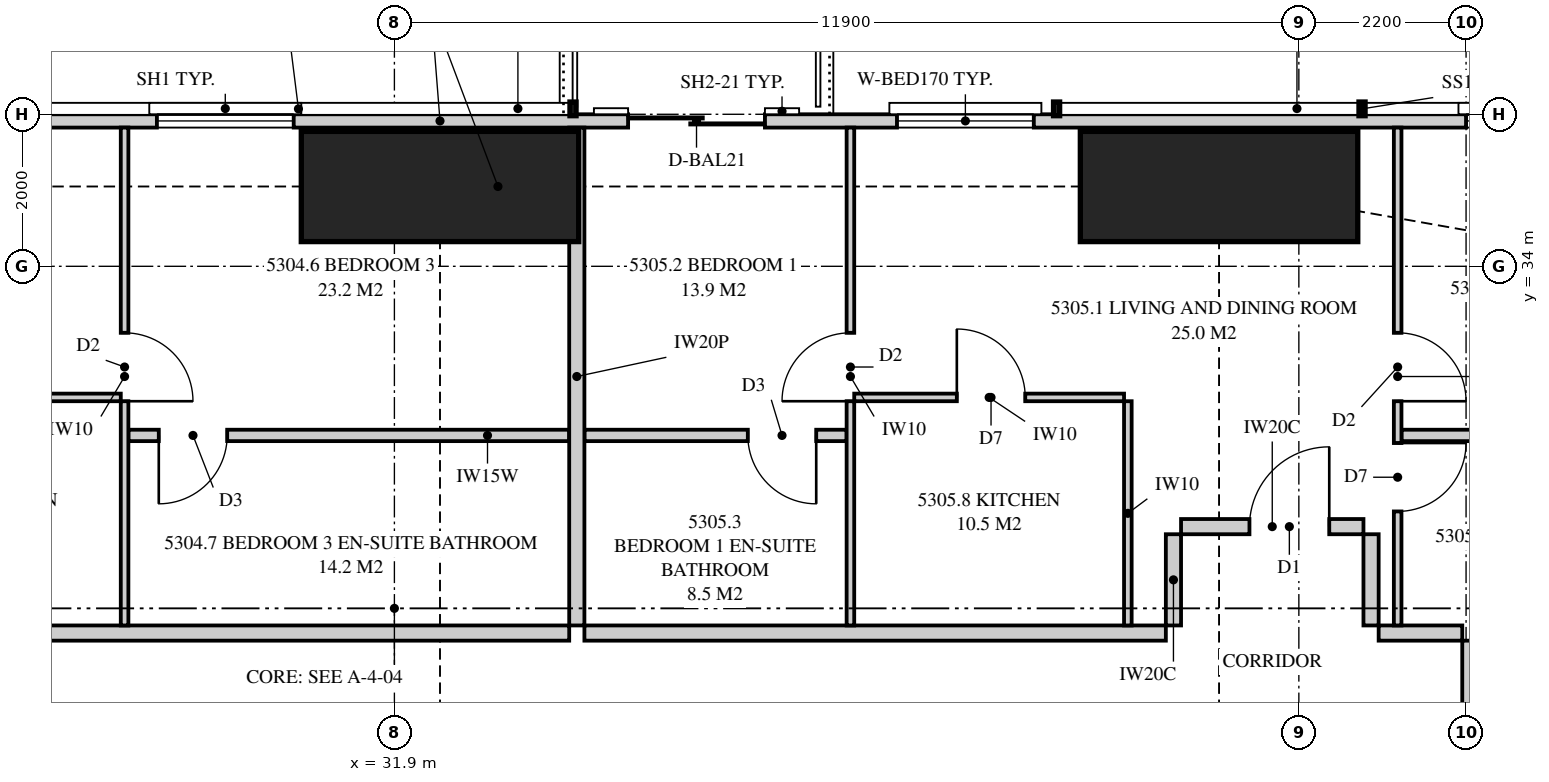
"""IFC4 building model, lengths in metres.
Left out: names, types, materials, properties, quantities, classifications, styles, units other than length and angle.
Written with IfcOpenShell. Run it as: python <this file> out.ifc"""

import sys

from ifc_helpers import new_model, si_unit, direction, frame, frame_2d, origin, origin_2d, place, context, subcontext, project, spatial, polyline, rectangle, outline, extrude, element, fill, save


model = new_model("IFC4")
c1 = context("Model", 3, precision=1e-05, world=origin(), true_north=direction((0.0, 1.0)))
c2 = subcontext(c1, "Body", "Model", "MODEL_VIEW")
j1 = project(units=[si_unit("LENGTHUNIT", "METRE"), si_unit("PLANEANGLEUNIT", "RADIAN")], contexts=[c1])
p1 = place(None, origin())
s1 = spatial("IfcSite", under=j1, at=p1, CompositionType="ELEMENT")
p2 = place(p1, origin())
s2 = spatial("IfcBuilding", under=s1, at=p2, CompositionType="ELEMENT")
p3 = place(p2, frame((0.0, 0.0, 194.55)))
s3 = spatial("IfcBuildingStorey", under=s2, at=p3, CompositionType="ELEMENT", Elevation=194.55)
for number, where, z_axis, x_axis in (
    (1, (42.75, 35.05, 0.0), (0.0, 0.0, 1.0), (0.0, 1.0, 0.0)),
    (2, (32.5, 35.05, 0.0), (0.0, 0.0, 1.0), (0.0, 1.0, 0.0)),
):
    element("IfcColumn", number, at=place(p3, frame(where, z_axis=z_axis, x_axis=x_axis)), inside=s3, PredefinedType="COLUMN", context=c2, shape_type="SweptSolid", body=[
        extrude(rectangle(XDim=1.45, YDim=3.65, at=origin_2d()), origin(), (0.0, 0.0, 1.0), 3.35),
    ])
p4 = place(p3, frame((49.949, 35.913, 0.0), z_axis=(0.0, 0.0, 1.0), x_axis=(-1.0, 0.0, 0.0)))
e3 = element("IfcWall", 3, at=p4, inside=s3, PredefinedType="SOLIDWALL", context=c2, shape_type="SweptSolid", body=[
    extrude(outline(polyline([(0.0, 0.0), (34.897, 0.0), (34.897, 3.11), (27.91, 3.11), (27.91, 2.15), (27.836, 2.15), (27.836, 3.11), (27.699, 3.11), (27.699, 2.15), (7.199, 2.15), (7.199, 3.11), (7.062, 3.11), (7.062, 2.15), (6.987, 2.15), (6.987, 3.11), (0.0, 3.11), (0.0, 0.0)])), frame((0.0, 0.087, 0.0), z_axis=(0.0, -1.0, 0.0), x_axis=(1.0, 0.0, 0.0)), (0.0, 0.0, 1.0), 0.175),
])
p5 = place(p4, frame((2.149, 0.0, 0.4)))
e4 = element("IfcOpeningElement", 4, at=p5, cuts=e3, PredefinedType="OPENING", context=c2, shape_type="SweptSolid", body=[
    extrude(rectangle(XDim=1.8, YDim=1.7, at=frame_2d((0.9, 0.85))), frame((0.0, 0.097, 0.0), z_axis=(0.0, -1.0, 0.0), x_axis=(1.0, 0.0, 0.0)), (0.0, 0.0, 1.0), 0.195),
])
p6 = place(p4, frame((9.636, 0.0, 0.4)))
e5 = element("IfcOpeningElement", 5, at=p6, cuts=e3, PredefinedType="OPENING", context=c2, shape_type="SweptSolid", body=[
    extrude(rectangle(XDim=1.8, YDim=1.7, at=frame_2d((0.9, 0.85))), frame((0.0, 0.097, 0.0), z_axis=(0.0, -1.0, 0.0), x_axis=(1.0, 0.0, 0.0)), (0.0, 0.0, 1.0), 0.195),
])
p7 = place(p4, frame((13.174, 0.0, 0.0)))
e6 = element("IfcOpeningElement", 6, at=p7, cuts=e3, PredefinedType="OPENING", context=c2, shape_type="SweptSolid", body=[
    extrude(rectangle(XDim=1.8, YDim=2.1, at=frame_2d((0.9, 1.05))), frame((0.0, 0.097, 0.0), z_axis=(0.0, -1.0, 0.0), x_axis=(1.0, 0.0, 0.0)), (0.0, 0.0, 1.0), 0.195),
])
p8 = place(p4, frame((19.374, 0.0, 0.4)))
e7 = element("IfcOpeningElement", 7, at=p8, cuts=e3, PredefinedType="OPENING", context=c2, shape_type="SweptSolid", body=[
    extrude(rectangle(XDim=1.8, YDim=1.7, at=frame_2d((0.9, 0.85))), frame((0.0, 0.097, 0.0), z_axis=(0.0, -1.0, 0.0), x_axis=(1.0, 0.0, 0.0)), (0.0, 0.0, 1.0), 0.195),
])
p9 = place(p4, frame((23.224, 0.0, 0.4)))
e8 = element("IfcOpeningElement", 8, at=p9, cuts=e3, PredefinedType="OPENING", context=c2, shape_type="SweptSolid", body=[
    extrude(rectangle(XDim=2.4, YDim=1.7, at=frame_2d((1.2, 0.85))), frame((0.0, 0.097, 0.0), z_axis=(0.0, -1.0, 0.0), x_axis=(1.0, 0.0, 0.0)), (0.0, 0.0, 1.0), 0.195),
])
p10 = place(p4, frame((32.399, 0.0, 0.4)))
e9 = element("IfcOpeningElement", 9, at=p10, cuts=e3, PredefinedType="OPENING", context=c2, shape_type="SweptSolid", body=[
    extrude(rectangle(XDim=1.8, YDim=1.7, at=frame_2d((0.9, 0.85))), frame((0.0, 0.097, 0.0), z_axis=(0.0, -1.0, 0.0), x_axis=(1.0, 0.0, 0.0)), (0.0, 0.0, 1.0), 0.195),
])
p11 = place(p3, frame((34.3, 35.825, 0.0), z_axis=(0.0, 0.0, 1.0), x_axis=(0.0, -1.0, 0.0)))
e10 = element("IfcWall", 10, at=p11, inside=s3, PredefinedType="PARTITIONING", context=c2, shape_type="SweptSolid", body=[
    extrude(outline(polyline([(0.0, 0.0), (6.55, 0.0), (6.55, 3.11), (1.685, 3.11), (1.685, 2.15), (0.0, 2.15), (0.0, 3.11), (0.0, 0.0)])), frame((0.0, 0.1, 0.0), z_axis=(0.0, -1.0, 0.0), x_axis=(1.0, 0.0, 0.0)), (0.0, 0.0, 1.0), 0.2),
])
p12 = place(p3, frame((28.35, 35.825, 0.0), z_axis=(0.0, 0.0, 1.0), x_axis=(0.0, -1.0, 0.0)))
e11 = element("IfcWall", 11, at=p12, inside=s3, PredefinedType="PARTITIONING", context=c2, shape_type="SweptSolid", body=[
    extrude(outline(polyline([(0.0, 0.0), (6.55, 0.0), (6.55, 3.11), (1.635, 3.11), (1.635, 2.15), (0.0, 2.15), (0.0, 3.11), (0.0, 0.0)])), frame((0.0, 0.05, 0.0), z_axis=(0.0, -1.0, 0.0), x_axis=(1.0, 0.0, 0.0)), (0.0, 0.0, 1.0), 0.1),
])
p13 = place(p12, frame((2.7, 0.0, 0.0)))
e12 = element("IfcOpeningElement", 12, at=p13, cuts=e11, PredefinedType="OPENING", context=c2, shape_type="SweptSolid", body=[
    extrude(rectangle(XDim=0.9, YDim=2.1, at=frame_2d((0.45, 1.05))), frame((0.0, 0.06, 0.0), z_axis=(0.0, -1.0, 0.0), x_axis=(1.0, 0.0, 0.0)), (0.0, 0.0, 1.0), 0.12),
])
p14 = place(p3, frame((28.4, 31.775, 0.0), z_axis=(0.0, 0.0, 1.0), x_axis=(1.0, 0.0, 0.0)))
e13 = element("IfcWall", 13, at=p14, inside=s3, PredefinedType="PLUMBINGWALL", context=c2, shape_type="SweptSolid", body=[
    extrude(outline(polyline([(0.0, 0.0), (5.8, 0.0), (5.8, 3.11), (4.412, 3.11), (4.412, 2.541), (3.788, 2.541), (3.788, 3.11), (0.0, 3.11), (0.0, 0.0)])), frame((0.0, 0.075, 0.0), z_axis=(0.0, -1.0, 0.0), x_axis=(1.0, 0.0, 0.0)), (0.0, 0.0, 1.0), 0.15),
])
p15 = place(p14, frame((0.4, 0.0, 0.0)))
e14 = element("IfcOpeningElement", 14, at=p15, cuts=e13, PredefinedType="OPENING", context=c2, shape_type="SweptSolid", body=[
    extrude(rectangle(XDim=0.9, YDim=2.1, at=frame_2d((0.45, 1.05))), frame((0.0, 0.085, 0.0), z_axis=(0.0, -1.0, 0.0), x_axis=(1.0, 0.0, 0.0)), (0.0, 0.0, 1.0), 0.17),
])
p16 = place(p3, frame((24.75, 32.275, 0.0), z_axis=(0.0, 0.0, 1.0), x_axis=(1.0, 0.0, 0.0)))
e15 = element("IfcWall", 15, at=p16, inside=s3, PredefinedType="PARTITIONING", context=c2, shape_type="SweptSolid", body=[
    extrude(rectangle(XDim=3.55, YDim=0.1, at=frame_2d((1.775, 0.0))), origin(), (0.0, 0.0, 1.0), 3.11),
])
p17 = place(p16, frame((1.3, 0.0, 0.0)))
e16 = element("IfcOpeningElement", 16, at=p17, cuts=e15, PredefinedType="OPENING", context=c2, shape_type="SweptSolid", body=[
    extrude(rectangle(XDim=0.9, YDim=2.1, at=frame_2d((0.45, 1.05))), frame((0.0, 0.06, 0.0), z_axis=(0.0, -1.0, 0.0), x_axis=(1.0, 0.0, 0.0)), (0.0, 0.0, 1.0), 0.12),
])
p18 = place(p3, frame((34.4, 29.175, 0.0), z_axis=(0.0, 0.0, 1.0), x_axis=(1.0, 0.0, 0.0)))
e17 = element("IfcWall", 17, at=p18, inside=s3, PredefinedType="PARTITIONING", context=c2, shape_type="SweptSolid", body=[
    extrude(rectangle(XDim=7.65, YDim=0.2, at=frame_2d((3.825, 0.0))), origin(), (0.0, 0.0, 1.0), 3.11),
])
p19 = place(p3, frame((37.9, 35.825, 0.0), z_axis=(0.0, 0.0, 1.0), x_axis=(0.0, -1.0, 0.0)))
e18 = element("IfcWall", 18, at=p19, inside=s3, PredefinedType="PARTITIONING", context=c2, shape_type="SweptSolid", body=[
    extrude(outline(polyline([(0.0, 0.0), (6.55, 0.0), (6.55, 3.11), (1.635, 3.11), (1.635, 2.15), (0.0, 2.15), (0.0, 3.11), (0.0, 0.0)])), frame((0.0, 0.05, 0.0), z_axis=(0.0, -1.0, 0.0), x_axis=(1.0, 0.0, 0.0)), (0.0, 0.0, 1.0), 0.1),
])
p20 = place(p19, frame((2.7, 0.0, 0.0)))
e19 = element("IfcOpeningElement", 19, at=p20, cuts=e18, PredefinedType="OPENING", context=c2, shape_type="SweptSolid", body=[
    extrude(rectangle(XDim=0.9, YDim=2.1, at=frame_2d((0.45, 1.05))), frame((0.0, 0.06, 0.0), z_axis=(0.0, -1.0, 0.0), x_axis=(1.0, 0.0, 0.0)), (0.0, 0.0, 1.0), 0.12),
])
p21 = place(p3, frame((45.1, 35.825, 0.0), z_axis=(0.0, 0.0, 1.0), x_axis=(0.0, -1.0, 0.0)))
e20 = element("IfcWall", 20, at=p21, inside=s3, PredefinedType="PARTITIONING", context=c2, shape_type="SweptSolid", body=[
    extrude(outline(polyline([(0.0, 0.0), (6.55, 0.0), (6.55, 3.11), (2.064, 3.11), (2.064, 2.15), (0.318, 2.15), (0.318, 3.11), (0.0, 3.11), (0.0, 0.0)])), frame((0.0, 0.05, 0.0), z_axis=(0.0, -1.0, 0.0), x_axis=(1.0, 0.0, 0.0)), (0.0, 0.0, 1.0), 0.1),
])
p22 = place(p21, frame((2.7, 0.0, 0.0)))
e21 = element("IfcOpeningElement", 21, at=p22, cuts=e20, PredefinedType="OPENING", context=c2, shape_type="SweptSolid", body=[
    extrude(rectangle(XDim=0.9, YDim=2.1, at=frame_2d((0.45, 1.05))), frame((0.0, 0.06, 0.0), z_axis=(0.0, -1.0, 0.0), x_axis=(1.0, 0.0, 0.0)), (0.0, 0.0, 1.0), 0.12),
])
p23 = place(p21, frame((4.15, 0.0, 0.0)))
e22 = element("IfcOpeningElement", 22, at=p23, cuts=e20, PredefinedType="OPENING", context=c2, shape_type="SweptSolid", body=[
    extrude(rectangle(XDim=0.9, YDim=2.1, at=frame_2d((0.45, 1.05))), frame((0.0, 0.06, 0.0), z_axis=(0.0, -1.0, 0.0), x_axis=(1.0, 0.0, 0.0)), (0.0, 0.0, 1.0), 0.12),
])
p24 = place(p3, frame((34.4, 31.775, 0.0), z_axis=(0.0, 0.0, 1.0), x_axis=(1.0, 0.0, 0.0)))
e23 = element("IfcWall", 23, at=p24, inside=s3, PredefinedType="PLUMBINGWALL", context=c2, shape_type="SweptSolid", body=[
    extrude(rectangle(XDim=3.45, YDim=0.15, at=frame_2d((1.725, 0.0))), origin(), (0.0, 0.0, 1.0), 3.11),
])
p25 = place(p24, frame((2.15, 0.0, 0.0)))
e24 = element("IfcOpeningElement", 24, at=p25, cuts=e23, PredefinedType="OPENING", context=c2, shape_type="SweptSolid", body=[
    extrude(rectangle(XDim=0.9, YDim=2.1, at=frame_2d((0.45, 1.05))), frame((0.0, 0.085, 0.0), z_axis=(0.0, -1.0, 0.0), x_axis=(1.0, 0.0, 0.0)), (0.0, 0.0, 1.0), 0.17),
])
p26 = place(p3, frame((45.15, 31.775, 0.0), z_axis=(0.0, 0.0, 1.0), x_axis=(1.0, 0.0, 0.0)))
e25 = element("IfcWall", 25, at=p26, inside=s3, PredefinedType="PLUMBINGWALL", context=c2, shape_type="SweptSolid", body=[
    extrude(rectangle(XDim=3.5, YDim=0.15, at=frame_2d((1.75, 0.0))), origin(), (0.0, 0.0, 1.0), 3.11),
])
p27 = place(p3, frame((37.95, 32.275, 0.0), z_axis=(0.0, 0.0, 1.0), x_axis=(1.0, 0.0, 0.0)))
e26 = element("IfcWall", 26, at=p27, inside=s3, PredefinedType="PARTITIONING", context=c2, shape_type="SweptSolid", body=[
    extrude(rectangle(XDim=3.55, YDim=0.1, at=frame_2d((1.775, 0.0))), origin(), (0.0, 0.0, 1.0), 3.11),
])
p28 = place(p27, frame((1.35, 0.0, 0.0)))
e27 = element("IfcOpeningElement", 27, at=p28, cuts=e26, PredefinedType="OPENING", context=c2, shape_type="SweptSolid", body=[
    extrude(rectangle(XDim=0.9, YDim=2.1, at=frame_2d((0.45, 1.05))), frame((0.0, 0.06, 0.0), z_axis=(0.0, -1.0, 0.0), x_axis=(1.0, 0.0, 0.0)), (0.0, 0.0, 1.0), 0.12),
])
p29 = place(p3, frame((41.55, 32.225, 0.0), z_axis=(0.0, 0.0, 1.0), x_axis=(0.0, -1.0, 0.0)))
e28 = element("IfcWall", 28, at=p29, inside=s3, PredefinedType="PARTITIONING", context=c2, shape_type="SweptSolid", body=[
    extrude(rectangle(XDim=2.95, YDim=0.1, at=frame_2d((1.475, 0.0))), origin(), (0.0, 0.0, 1.0), 3.11),
])
p30 = place(p3, frame((46.05, 7.925, 0.0), z_axis=(0.0, 0.0, 1.0), x_axis=(0.0, 1.0, 0.0)))
e29 = element("IfcWall", 29, at=p30, inside=s3, PredefinedType="PARTITIONING", context=c2, shape_type="SweptSolid", body=[
    extrude(outline(polyline([(0.0, 0.0), (21.15, 0.0), (21.15, 3.11), (17.412, 3.11), (17.412, 2.541), (16.738, 2.541), (16.738, 3.11), (5.412, 3.11), (5.412, 2.541), (4.738, 2.541), (4.738, 3.11), (0.0, 3.11), (0.0, 0.0)])), frame((0.0, 0.1, 0.0), z_axis=(0.0, -1.0, 0.0), x_axis=(1.0, 0.0, 0.0)), (0.0, 0.0, 1.0), 0.2),
])
p31 = place(p30, frame((10.075, 0.0, 0.0)))
e30 = element("IfcOpeningElement", 30, at=p31, cuts=e29, PredefinedType="OPENING", context=c2, shape_type="SweptSolid", body=[
    extrude(rectangle(XDim=1.05, YDim=2.2, at=frame_2d((0.525, 1.1))), frame((0.0, 0.11, 0.0), z_axis=(0.0, -1.0, 0.0), x_axis=(1.0, 0.0, 0.0)), (0.0, 0.0, 1.0), 0.22),
])
p32 = place(p3, frame((24.55, 29.175, 0.0), z_axis=(0.0, 0.0, 1.0), x_axis=(1.0, 0.0, 0.0)))
e31 = element("IfcWall", 31, at=p32, inside=s3, PredefinedType="PARTITIONING", context=c2, shape_type="SweptSolid", body=[
    extrude(outline(polyline([(0.0, 0.0), (9.65, 0.0), (9.65, 3.11), (8.287, 3.11), (8.287, 2.541), (7.613, 2.541), (7.613, 3.11), (0.0, 3.11), (0.0, 0.0)])), frame((0.0, 0.1, 0.0), z_axis=(0.0, -1.0, 0.0), x_axis=(1.0, 0.0, 0.0)), (0.0, 0.0, 1.0), 0.2),
])
p33 = place(p3, frame((44.85, 29.175, 0.0), z_axis=(0.0, 0.0, 1.0), x_axis=(1.0, 0.0, 0.0)))
e32 = element("IfcWall", 32, at=p33, inside=s3, PredefinedType="PARTITIONING", context=c2, shape_type="SweptSolid", body=[
    extrude(rectangle(XDim=1.1, YDim=0.2, at=frame_2d((0.55, 0.0))), origin(), (0.0, 0.0, 1.0), 3.11),
])
p34 = place(p3, frame((42.25, 30.575, 0.0), z_axis=(0.0, 0.0, 1.0), x_axis=(1.0, 0.0, 0.0)))
e33 = element("IfcWall", 33, at=p34, inside=s3, PredefinedType="PARTITIONING", context=c2, shape_type="SweptSolid", body=[
    extrude(outline(polyline([(0.0, 0.0), (2.4, 0.0), (2.4, 3.11), (0.837, 3.11), (0.837, 2.541), (0.163, 2.541), (0.163, 3.11), (0.0, 3.11), (0.0, 0.0)])), frame((0.0, 0.1, 0.0), z_axis=(0.0, -1.0, 0.0), x_axis=(1.0, 0.0, 0.0)), (0.0, 0.0, 1.0), 0.2),
])
p35 = place(p34, frame((0.9, 0.0, 0.0)))
e34 = element("IfcOpeningElement", 34, at=p35, cuts=e33, PredefinedType="OPENING", context=c2, shape_type="SweptSolid", body=[
    extrude(rectangle(XDim=1.05, YDim=2.2, at=frame_2d((0.525, 1.1))), frame((0.0, 0.11, 0.0), z_axis=(0.0, -1.0, 0.0), x_axis=(1.0, 0.0, 0.0)), (0.0, 0.0, 1.0), 0.22),
])
for number, where, z_axis, x_axis in (
    (35, (42.15, 29.275, 0.0), (0.0, 0.0, 1.0), (0.0, 1.0, 0.0)),
    (36, (44.75, 29.275, 0.0), (0.0, 0.0, 1.0), (0.0, 1.0, 0.0)),
):
    element("IfcWall", number, at=place(p3, frame(where, z_axis=z_axis, x_axis=x_axis)), inside=s3, PredefinedType="PARTITIONING", context=c2, shape_type="SweptSolid", body=[
        extrude(rectangle(XDim=1.2, YDim=0.2, at=frame_2d((0.6, 0.0))), origin(), (0.0, 0.0, 1.0), 3.11),
    ])
p36 = place(p5, origin())
e37 = element("IfcWindow", 37, at=p36, inside=s3, PartitioningType="SINGLE_PANEL", PredefinedType="WINDOW", context=c2, shape_type="SweptSolid", body=[
    extrude(rectangle(XDim=1.8, YDim=1.7, at=frame_2d((0.9, 0.85))), frame((0.0, 0.03, 0.0), z_axis=(0.0, -1.0, 0.0), x_axis=(1.0, 0.0, 0.0)), (0.0, 0.0, 1.0), 0.06),
])
fill(e4, e37)
p37 = place(p6, origin())
e38 = element("IfcWindow", 38, at=p37, inside=s3, PartitioningType="SINGLE_PANEL", PredefinedType="WINDOW", context=c2, shape_type="SweptSolid", body=[
    extrude(rectangle(XDim=1.8, YDim=1.7, at=frame_2d((0.9, 0.85))), frame((0.0, 0.03, 0.0), z_axis=(0.0, -1.0, 0.0), x_axis=(1.0, 0.0, 0.0)), (0.0, 0.0, 1.0), 0.06),
])
fill(e5, e38)
p38 = place(p7, origin())
e39 = element("IfcDoor", 39, at=p38, inside=s3, OperationType="SLIDING_TO_LEFT", PredefinedType="DOOR", context=c2, shape_type="SweptSolid", body=[
    extrude(rectangle(XDim=1.8, YDim=2.1, at=frame_2d((0.9, 1.05))), frame((0.0, 0.025, 0.0), z_axis=(0.0, -1.0, 0.0), x_axis=(1.0, 0.0, 0.0)), (0.0, 0.0, 1.0), 0.05),
])
fill(e6, e39)
p39 = place(p8, origin())
e40 = element("IfcWindow", 40, at=p39, inside=s3, PartitioningType="SINGLE_PANEL", PredefinedType="WINDOW", context=c2, shape_type="SweptSolid", body=[
    extrude(rectangle(XDim=1.8, YDim=1.7, at=frame_2d((0.9, 0.85))), frame((0.0, 0.03, 0.0), z_axis=(0.0, -1.0, 0.0), x_axis=(1.0, 0.0, 0.0)), (0.0, 0.0, 1.0), 0.06),
])
fill(e7, e40)
p40 = place(p13, origin())
e41 = element("IfcDoor", 41, at=p40, inside=s3, OperationType="SINGLE_SWING_RIGHT", PredefinedType="DOOR", context=c2, shape_type="SweptSolid", body=[
    extrude(rectangle(XDim=0.9, YDim=2.1, at=frame_2d((0.45, 1.05))), frame((0.0, 0.025, 0.0), z_axis=(0.0, -1.0, 0.0), x_axis=(1.0, 0.0, 0.0)), (0.0, 0.0, 1.0), 0.05),
])
fill(e12, e41)
p41 = place(p15, frame((0.9, 0.0, 0.0), z_axis=(0.0, 0.0, 1.0), x_axis=(-1.0, 0.0, 0.0)))
e42 = element("IfcDoor", 42, at=p41, inside=s3, OperationType="SINGLE_SWING_RIGHT", PredefinedType="DOOR", context=c2, shape_type="SweptSolid", body=[
    extrude(rectangle(XDim=0.9, YDim=2.1, at=frame_2d((0.45, 1.05))), frame((0.0, 0.025, 0.0), z_axis=(0.0, -1.0, 0.0), x_axis=(1.0, 0.0, 0.0)), (0.0, 0.0, 1.0), 0.05),
])
fill(e14, e42)
p42 = place(p35, origin())
e43 = element("IfcDoor", 43, at=p42, inside=s3, OperationType="SINGLE_SWING_RIGHT", PredefinedType="DOOR", context=c2, shape_type="SweptSolid", body=[
    extrude(rectangle(XDim=1.05, YDim=2.2, at=frame_2d((0.525, 1.1))), frame((0.0, 0.025, 0.0), z_axis=(0.0, -1.0, 0.0), x_axis=(1.0, 0.0, 0.0)), (0.0, 0.0, 1.0), 0.05),
])
fill(e34, e43)
p43 = place(p20, frame((0.9, 0.0, 0.0), z_axis=(0.0, 0.0, 1.0), x_axis=(-1.0, 0.0, 0.0)))
e44 = element("IfcDoor", 44, at=p43, inside=s3, OperationType="SINGLE_SWING_LEFT", PredefinedType="DOOR", context=c2, shape_type="SweptSolid", body=[
    extrude(rectangle(XDim=0.9, YDim=2.1, at=frame_2d((0.45, 1.05))), frame((0.0, 0.025, 0.0), z_axis=(0.0, -1.0, 0.0), x_axis=(1.0, 0.0, 0.0)), (0.0, 0.0, 1.0), 0.05),
])
fill(e19, e44)
p44 = place(p25, frame((0.9, 0.0, 0.0), z_axis=(0.0, 0.0, 1.0), x_axis=(-1.0, 0.0, 0.0)))
e45 = element("IfcDoor", 45, at=p44, inside=s3, OperationType="SINGLE_SWING_LEFT", PredefinedType="DOOR", context=c2, shape_type="SweptSolid", body=[
    extrude(rectangle(XDim=0.9, YDim=2.1, at=frame_2d((0.45, 1.05))), frame((0.0, 0.025, 0.0), z_axis=(0.0, -1.0, 0.0), x_axis=(1.0, 0.0, 0.0)), (0.0, 0.0, 1.0), 0.05),
])
fill(e24, e45)
p45 = place(p22, origin())
e46 = element("IfcDoor", 46, at=p45, inside=s3, OperationType="SINGLE_SWING_RIGHT", PredefinedType="DOOR", context=c2, shape_type="SweptSolid", body=[
    extrude(rectangle(XDim=0.9, YDim=2.1, at=frame_2d((0.45, 1.05))), frame((0.0, 0.025, 0.0), z_axis=(0.0, -1.0, 0.0), x_axis=(1.0, 0.0, 0.0)), (0.0, 0.0, 1.0), 0.05),
])
fill(e21, e46)
p46 = place(p23, origin())
e47 = element("IfcDoor", 47, at=p46, inside=s3, OperationType="SINGLE_SWING_LEFT", PredefinedType="DOOR", context=c2, shape_type="SweptSolid", body=[
    extrude(rectangle(XDim=0.9, YDim=2.1, at=frame_2d((0.45, 1.05))), frame((0.0, 0.025, 0.0), z_axis=(0.0, -1.0, 0.0), x_axis=(1.0, 0.0, 0.0)), (0.0, 0.0, 1.0), 0.05),
])
fill(e22, e47)
p47 = place(p28, origin())
e48 = element("IfcDoor", 48, at=p47, inside=s3, OperationType="SINGLE_SWING_LEFT", PredefinedType="DOOR", context=c2, shape_type="SweptSolid", body=[
    extrude(rectangle(XDim=0.9, YDim=2.1, at=frame_2d((0.45, 1.05))), frame((0.0, 0.025, 0.0), z_axis=(0.0, -1.0, 0.0), x_axis=(1.0, 0.0, 0.0)), (0.0, 0.0, 1.0), 0.05),
])
fill(e27, e48)
save(model, sys.argv[1])
